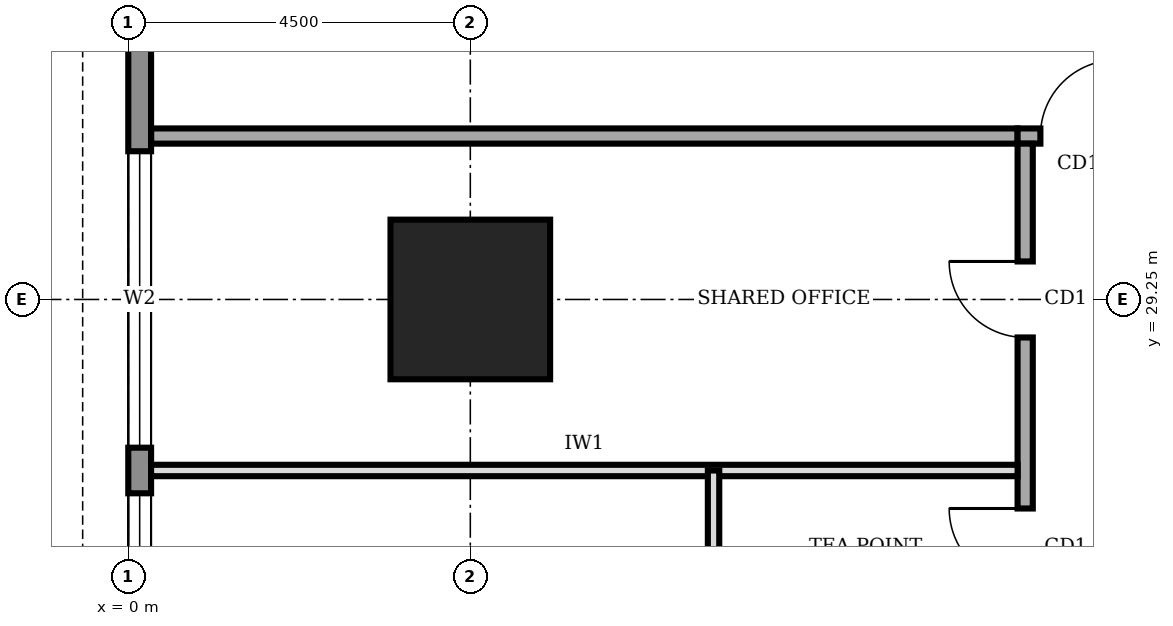
"""IFC4 building model, lengths in metres.
Left out: names, types, materials, properties, quantities, classifications, styles, units other than length and angle.
Written with IfcOpenShell. Run it as: python <this file> out.ifc"""

import sys

from ifc_helpers import new_model, si_unit, direction, frame, frame_2d, origin, origin_2d, place, context, subcontext, project, spatial, rectangle, extrude, element, fill, save


model = new_model("IFC4")
c1 = context("Model", 3, precision=1e-05, world=origin(), true_north=direction((0.0, 1.0)))
c2 = subcontext(c1, "Body", "Model", "MODEL_VIEW")
j1 = project(units=[si_unit("LENGTHUNIT", "METRE"), si_unit("PLANEANGLEUNIT", "RADIAN")], contexts=[c1])
p1 = place(None, origin())
s1 = spatial("IfcSite", under=j1, at=p1, CompositionType="ELEMENT")
p2 = place(p1, origin())
s2 = spatial("IfcBuilding", under=s1, at=p2, CompositionType="ELEMENT")
p3 = place(p2, frame((0.0, 0.0, 145.0)))
s3 = spatial("IfcBuildingStorey", under=s2, at=p3, CompositionType="ELEMENT", Elevation=145.0)
p4 = place(p3, frame((4.5, 29.25, 0.0), z_axis=(0.0, 0.0, 1.0), x_axis=(1.0, 0.0, 0.0)))
e1 = element("IfcColumn", 1, at=p4, inside=s3, PredefinedType="COLUMN", context=c2, shape_type="SweptSolid", body=[
    extrude(rectangle(XDim=2.1, YDim=2.1, at=origin_2d()), origin(), (0.0, 0.0, 1.0), 4.0),
])
p5 = place(p3, frame((0.15, 35.98, 0.0), z_axis=(0.0, 0.0, 1.0), x_axis=(0.0, -1.0, 0.0)))
e2 = element("IfcWall", 2, at=p5, inside=s3, PredefinedType="STANDARD", context=c2, shape_type="SweptSolid", body=[
    extrude(rectangle(XDim=31.46, YDim=0.3, at=frame_2d((15.73, 0.0))), origin(), (0.0, 0.0, 1.0), 3.75),
])
p6 = place(p5, frame((27.28, 0.0, 0.6)))
e3 = element("IfcOpeningElement", 3, at=p6, cuts=e2, PredefinedType="OPENING", context=c2, shape_type="SweptSolid", body=[
    extrude(rectangle(XDim=3.9, YDim=2.6, at=frame_2d((1.95, 1.3))), frame((0.0, 0.16, 0.0), z_axis=(0.0, -1.0, 0.0), x_axis=(1.0, 0.0, 0.0)), (0.0, 0.0, 1.0), 0.32),
])
p7 = place(p5, frame((22.78, 0.0, 0.6)))
e4 = element("IfcOpeningElement", 4, at=p7, cuts=e2, PredefinedType="OPENING", context=c2, shape_type="SweptSolid", body=[
    extrude(rectangle(XDim=3.9, YDim=2.6, at=frame_2d((1.95, 1.3))), frame((0.0, 0.16, 0.0), z_axis=(0.0, -1.0, 0.0), x_axis=(1.0, 0.0, 0.0)), (0.0, 0.0, 1.0), 0.32),
])
p8 = place(p5, frame((18.28, 0.0, 0.6)))
e5 = element("IfcOpeningElement", 5, at=p8, cuts=e2, PredefinedType="OPENING", context=c2, shape_type="SweptSolid", body=[
    extrude(rectangle(XDim=3.9, YDim=2.6, at=frame_2d((1.95, 1.3))), frame((0.0, 0.16, 0.0), z_axis=(0.0, -1.0, 0.0), x_axis=(1.0, 0.0, 0.0)), (0.0, 0.0, 1.0), 0.32),
])
p9 = place(p5, frame((13.78, 0.0, 0.6)))
e6 = element("IfcOpeningElement", 6, at=p9, cuts=e2, PredefinedType="OPENING", context=c2, shape_type="SweptSolid", body=[
    extrude(rectangle(XDim=3.9, YDim=2.6, at=frame_2d((1.95, 1.3))), frame((0.0, 0.16, 0.0), z_axis=(0.0, -1.0, 0.0), x_axis=(1.0, 0.0, 0.0)), (0.0, 0.0, 1.0), 0.32),
])
p10 = place(p5, frame((9.28, 0.0, 0.6)))
e7 = element("IfcOpeningElement", 7, at=p10, cuts=e2, PredefinedType="OPENING", context=c2, shape_type="SweptSolid", body=[
    extrude(rectangle(XDim=3.9, YDim=2.6, at=frame_2d((1.95, 1.3))), frame((0.0, 0.16, 0.0), z_axis=(0.0, -1.0, 0.0), x_axis=(1.0, 0.0, 0.0)), (0.0, 0.0, 1.0), 0.32),
])
p11 = place(p5, frame((4.78, 0.0, 0.6)))
e8 = element("IfcOpeningElement", 8, at=p11, cuts=e2, PredefinedType="OPENING", context=c2, shape_type="SweptSolid", body=[
    extrude(rectangle(XDim=3.9, YDim=2.6, at=frame_2d((1.95, 1.3))), frame((0.0, 0.16, 0.0), z_axis=(0.0, -1.0, 0.0), x_axis=(1.0, 0.0, 0.0)), (0.0, 0.0, 1.0), 0.32),
])
p12 = place(p3, frame((40.2, 31.4, 0.0), z_axis=(0.0, 0.0, 1.0), x_axis=(-1.0, 0.0, 0.0)))
e9 = element("IfcWall", 9, at=p12, inside=s3, PredefinedType="SOLIDWALL", context=c2, shape_type="SweptSolid", body=[
    extrude(rectangle(XDim=28.5, YDim=0.2, at=frame_2d((14.25, 0.0))), origin(), (0.0, 0.0, 1.0), 3.75),
])
p13 = place(p12, frame((27.2, 0.0, 0.0)))
e10 = element("IfcOpeningElement", 10, at=p13, cuts=e9, PredefinedType="OPENING", context=c2, shape_type="SweptSolid", body=[
    extrude(rectangle(XDim=1.0, YDim=2.1, at=frame_2d((0.5, 1.05))), frame((0.0, 0.11, 0.0), z_axis=(0.0, -1.0, 0.0), x_axis=(1.0, 0.0, 0.0)), (0.0, 0.0, 1.0), 0.22),
])
p14 = place(p12, frame((23.95, 0.0, 0.0)))
e11 = element("IfcOpeningElement", 11, at=p14, cuts=e9, PredefinedType="OPENING", context=c2, shape_type="SweptSolid", body=[
    extrude(rectangle(XDim=1.0, YDim=2.1, at=frame_2d((0.5, 1.05))), frame((0.0, 0.11, 0.0), z_axis=(0.0, -1.0, 0.0), x_axis=(1.0, 0.0, 0.0)), (0.0, 0.0, 1.0), 0.22),
])
p15 = place(p12, frame((17.2, 0.0, 0.0)))
e12 = element("IfcOpeningElement", 12, at=p15, cuts=e9, PredefinedType="OPENING", context=c2, shape_type="SweptSolid", body=[
    extrude(rectangle(XDim=1.0, YDim=2.1, at=frame_2d((0.5, 1.05))), frame((0.0, 0.11, 0.0), z_axis=(0.0, -1.0, 0.0), x_axis=(1.0, 0.0, 0.0)), (0.0, 0.0, 1.0), 0.22),
])
p16 = place(p12, frame((5.6, 0.0, 0.0)))
e13 = element("IfcOpeningElement", 13, at=p16, cuts=e9, PredefinedType="OPENING", context=c2, shape_type="SweptSolid", body=[
    extrude(rectangle(XDim=1.8, YDim=2.1, at=frame_2d((0.9, 1.05))), frame((0.0, 0.11, 0.0), z_axis=(0.0, -1.0, 0.0), x_axis=(1.0, 0.0, 0.0)), (0.0, 0.0, 1.0), 0.22),
])
p17 = place(p3, frame((11.8, 31.3, 0.0), z_axis=(0.0, 0.0, 1.0), x_axis=(0.0, -1.0, 0.0)))
e14 = element("IfcWall", 14, at=p17, inside=s3, PredefinedType="SOLIDWALL", context=c2, shape_type="SweptSolid", body=[
    extrude(rectangle(XDim=22.3, YDim=0.2, at=frame_2d((11.15, 0.0))), origin(), (0.0, 0.0, 1.0), 3.75),
])
p18 = place(p17, frame((19.55, 0.0, 0.0)))
e15 = element("IfcOpeningElement", 15, at=p18, cuts=e14, PredefinedType="OPENING", context=c2, shape_type="SweptSolid", body=[
    extrude(rectangle(XDim=1.0, YDim=2.1, at=frame_2d((0.5, 1.05))), frame((0.0, 0.11, 0.0), z_axis=(0.0, -1.0, 0.0), x_axis=(1.0, 0.0, 0.0)), (0.0, 0.0, 1.0), 0.22),
])
p19 = place(p17, frame((16.15, 0.0, 0.0)))
e16 = element("IfcOpeningElement", 16, at=p19, cuts=e14, PredefinedType="OPENING", context=c2, shape_type="SweptSolid", body=[
    extrude(rectangle(XDim=0.9, YDim=2.1, at=frame_2d((0.45, 1.05))), frame((0.0, 0.11, 0.0), z_axis=(0.0, -1.0, 0.0), x_axis=(1.0, 0.0, 0.0)), (0.0, 0.0, 1.0), 0.22),
])
p20 = place(p17, frame((12.95, 0.0, 0.0)))
e17 = element("IfcOpeningElement", 17, at=p20, cuts=e14, PredefinedType="OPENING", context=c2, shape_type="SweptSolid", body=[
    extrude(rectangle(XDim=0.9, YDim=2.1, at=frame_2d((0.45, 1.05))), frame((0.0, 0.11, 0.0), z_axis=(0.0, -1.0, 0.0), x_axis=(1.0, 0.0, 0.0)), (0.0, 0.0, 1.0), 0.22),
])
p21 = place(p17, frame((7.4, 0.0, 0.0)))
e18 = element("IfcOpeningElement", 18, at=p21, cuts=e14, PredefinedType="OPENING", context=c2, shape_type="SweptSolid", body=[
    extrude(rectangle(XDim=0.9, YDim=2.1, at=frame_2d((0.45, 1.05))), frame((0.0, 0.11, 0.0), z_axis=(0.0, -1.0, 0.0), x_axis=(1.0, 0.0, 0.0)), (0.0, 0.0, 1.0), 0.22),
])
p22 = place(p17, frame((4.8, 0.0, 0.0)))
e19 = element("IfcOpeningElement", 19, at=p22, cuts=e14, PredefinedType="OPENING", context=c2, shape_type="SweptSolid", body=[
    extrude(rectangle(XDim=1.0, YDim=2.1, at=frame_2d((0.5, 1.05))), frame((0.0, 0.11, 0.0), z_axis=(0.0, -1.0, 0.0), x_axis=(1.0, 0.0, 0.0)), (0.0, 0.0, 1.0), 0.22),
])
p23 = place(p17, frame((9.9, 0.0, 0.0)))
e20 = element("IfcOpeningElement", 20, at=p23, cuts=e14, PredefinedType="OPENING", context=c2, shape_type="SweptSolid", body=[
    extrude(rectangle(XDim=1.0, YDim=2.1, at=frame_2d((0.5, 1.05))), frame((0.0, 0.11, 0.0), z_axis=(0.0, -1.0, 0.0), x_axis=(1.0, 0.0, 0.0)), (0.0, 0.0, 1.0), 0.22),
])
p24 = place(p17, frame((1.55, 0.0, 0.0)))
e21 = element("IfcOpeningElement", 21, at=p24, cuts=e14, PredefinedType="OPENING", context=c2, shape_type="SweptSolid", body=[
    extrude(rectangle(XDim=1.0, YDim=2.1, at=frame_2d((0.5, 1.05))), frame((0.0, 0.11, 0.0), z_axis=(0.0, -1.0, 0.0), x_axis=(1.0, 0.0, 0.0)), (0.0, 0.0, 1.0), 0.22),
])
p25 = place(p3, frame((0.3, 31.4, 0.0), z_axis=(0.0, 0.0, 1.0), x_axis=(1.0, 0.0, 0.0)))
e22 = element("IfcWall", 22, at=p25, inside=s3, PredefinedType="SOLIDWALL", context=c2, shape_type="SweptSolid", body=[
    extrude(rectangle(XDim=11.4, YDim=0.2, at=frame_2d((5.7, 0.0))), origin(), (0.0, 0.0, 1.0), 3.75),
])
p26 = place(p3, frame((0.3, 27.0, 0.0), z_axis=(0.0, 0.0, 1.0), x_axis=(1.0, 0.0, 0.0)))
e23 = element("IfcWall", 23, at=p26, inside=s3, PredefinedType="PARTITIONING", context=c2, shape_type="SweptSolid", body=[
    extrude(rectangle(XDim=11.4, YDim=0.15, at=frame_2d((5.7, 0.0))), origin(), (0.0, 0.0, 1.0), 3.75),
])
p27 = place(p3, frame((7.7, 25.0, 0.0), z_axis=(0.0, 0.0, 1.0), x_axis=(0.0, 1.0, 0.0)))
e24 = element("IfcWall", 24, at=p27, inside=s3, PredefinedType="PARTITIONING", context=c2, shape_type="SweptSolid", body=[
    extrude(rectangle(XDim=2.0, YDim=0.15, at=frame_2d((1.0, 0.0))), origin(), (0.0, 0.0, 1.0), 3.75),
])
p28 = place(p10, origin())
e25 = element("IfcWindow", 25, at=p28, inside=s3, PartitioningType="SINGLE_PANEL", PredefinedType="WINDOW", context=c2, shape_type="SweptSolid", body=[
    extrude(rectangle(XDim=3.9, YDim=2.6, at=frame_2d((1.95, 1.3))), frame((0.0, 0.03, 0.0), z_axis=(0.0, -1.0, 0.0), x_axis=(1.0, 0.0, 0.0)), (0.0, 0.0, 1.0), 0.06),
])
fill(e7, e25)
p29 = place(p11, origin())
e26 = element("IfcWindow", 26, at=p29, inside=s3, PartitioningType="SINGLE_PANEL", PredefinedType="WINDOW", context=c2, shape_type="SweptSolid", body=[
    extrude(rectangle(XDim=3.9, YDim=2.6, at=frame_2d((1.95, 1.3))), frame((0.0, 0.03, 0.0), z_axis=(0.0, -1.0, 0.0), x_axis=(1.0, 0.0, 0.0)), (0.0, 0.0, 1.0), 0.06),
])
fill(e8, e26)
p30 = place(p13, frame((1.0, 0.0, 0.0), z_axis=(0.0, 0.0, 1.0), x_axis=(-1.0, 0.0, 0.0)))
e27 = element("IfcDoor", 27, at=p30, inside=s3, OperationType="SINGLE_SWING_RIGHT", PredefinedType="DOOR", context=c2, shape_type="SweptSolid", body=[
    extrude(rectangle(XDim=1.0, YDim=2.1, at=frame_2d((0.5, 1.05))), frame((0.0, 0.025, 0.0), z_axis=(0.0, -1.0, 0.0), x_axis=(1.0, 0.0, 0.0)), (0.0, 0.0, 1.0), 0.05),
])
fill(e10, e27)
p31 = place(p22, frame((1.0, 0.0, 0.0), z_axis=(0.0, 0.0, 1.0), x_axis=(-1.0, 0.0, 0.0)))
e28 = element("IfcDoor", 28, at=p31, inside=s3, OperationType="SINGLE_SWING_RIGHT", PredefinedType="DOOR", context=c2, shape_type="SweptSolid", body=[
    extrude(rectangle(XDim=1.0, YDim=2.1, at=frame_2d((0.5, 1.05))), frame((0.0, 0.025, 0.0), z_axis=(0.0, -1.0, 0.0), x_axis=(1.0, 0.0, 0.0)), (0.0, 0.0, 1.0), 0.05),
])
fill(e19, e28)
p32 = place(p24, frame((1.0, 0.0, 0.0), z_axis=(0.0, 0.0, 1.0), x_axis=(-1.0, 0.0, 0.0)))
e29 = element("IfcDoor", 29, at=p32, inside=s3, OperationType="SINGLE_SWING_RIGHT", PredefinedType="DOOR", context=c2, shape_type="SweptSolid", body=[
    extrude(rectangle(XDim=1.0, YDim=2.1, at=frame_2d((0.5, 1.05))), frame((0.0, 0.025, 0.0), z_axis=(0.0, -1.0, 0.0), x_axis=(1.0, 0.0, 0.0)), (0.0, 0.0, 1.0), 0.05),
])
fill(e21, e29)
save(model, sys.argv[1])
